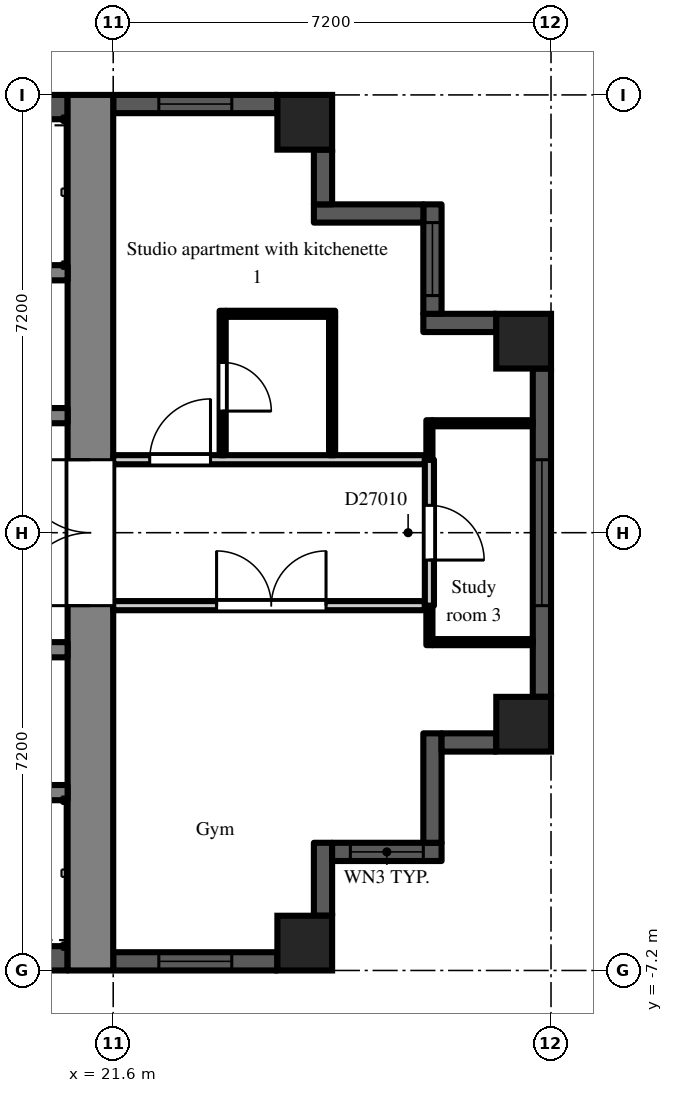
"""IFC4 building model, lengths in metres.
Left out: names, types, materials, properties, quantities, classifications, styles, units other than length and angle.
Written with IfcOpenShell. Run it as: python <this file> out.ifc"""

import sys

from ifc_helpers import new_model, si_unit, direction, frame, frame_2d, origin, origin_2d, place, context, subcontext, project, spatial, rectangle, extrude, element, fill, save


model = new_model("IFC4")
c1 = context("Model", 3, precision=1e-05, world=origin(), true_north=direction((0.0, 1.0)))
c2 = subcontext(c1, "Body", "Model", "MODEL_VIEW")
j1 = project(units=[si_unit("LENGTHUNIT", "METRE"), si_unit("PLANEANGLEUNIT", "RADIAN")], contexts=[c1])
p1 = place(None, origin())
s1 = spatial("IfcSite", under=j1, at=p1, CompositionType="ELEMENT")
p2 = place(p1, origin())
s2 = spatial("IfcBuilding", under=s1, at=p2, CompositionType="ELEMENT")
p3 = place(p2, frame((0.0, 0.0, 188.7)))
s3 = spatial("IfcBuildingStorey", under=s2, at=p3, CompositionType="ELEMENT", Elevation=188.7)
for number, where, z_axis, x_axis in (
    (1, (24.75, -6.75, 0.0), (0.0, 0.0, 1.0), (1.0, 0.0, 0.0)),
    (2, (24.75, 6.75, 0.0), (0.0, 0.0, 1.0), (1.0, 0.0, 0.0)),
    (3, (28.35, -3.15, 0.0), (0.0, 0.0, 1.0), (1.0, 0.0, 0.0)),
    (4, (28.35, 3.15, 0.0), (0.0, 0.0, 1.0), (1.0, 0.0, 0.0)),
):
    element("IfcColumn", number, at=place(p3, frame(where, z_axis=z_axis, x_axis=x_axis)), inside=s3, PredefinedType="COLUMN", context=c2, shape_type="SweptSolid", body=[
        extrude(rectangle(XDim=0.9, YDim=0.9, at=origin_2d()), origin(), (0.0, 0.0, 1.0), 3.0),
    ])
p4 = place(p3, frame((21.6, -7.05, 0.0), z_axis=(0.0, 0.0, 1.0), x_axis=(1.0, 0.0, 0.0)))
e5 = element("IfcWall", 5, at=p4, inside=s3, PredefinedType="SOLIDWALL", context=c2, shape_type="SweptSolid", body=[
    extrude(rectangle(XDim=2.7, YDim=0.3, at=frame_2d((1.35, 0.0))), origin(), (0.0, 0.0, 1.0), 2.2),
])
p5 = place(p4, frame((0.75, 0.0, 0.2)))
e6 = element("IfcOpeningElement", 6, at=p5, cuts=e5, PredefinedType="OPENING", context=c2, shape_type="SweptSolid", body=[
    extrude(rectangle(XDim=1.2, YDim=1.85, at=frame_2d((0.6, 0.925))), frame((0.0, 0.16, 0.0), z_axis=(0.0, -1.0, 0.0), x_axis=(1.0, 0.0, 0.0)), (0.0, 0.0, 1.0), 0.32),
])
p6 = place(p3, frame((25.05, -6.3, 0.0), z_axis=(0.0, 0.0, 1.0), x_axis=(0.0, 1.0, 0.0)))
e7 = element("IfcWall", 7, at=p6, inside=s3, PredefinedType="SOLIDWALL", context=c2, shape_type="SweptSolid", body=[
    extrude(rectangle(XDim=1.2, YDim=0.3, at=frame_2d((0.6, 0.0))), origin(), (0.0, 0.0, 1.0), 2.6),
])
p7 = place(p3, frame((25.2, -5.25, 0.0), z_axis=(0.0, 0.0, 1.0), x_axis=(1.0, 0.0, 0.0)))
e8 = element("IfcWall", 8, at=p7, inside=s3, PredefinedType="SOLIDWALL", context=c2, shape_type="SweptSolid", body=[
    extrude(rectangle(XDim=1.8, YDim=0.3, at=frame_2d((0.9, 0.0))), origin(), (0.0, 0.0, 1.0), 2.6),
])
p8 = place(p7, frame((0.3, 0.0, 0.2)))
e9 = element("IfcOpeningElement", 9, at=p8, cuts=e8, PredefinedType="OPENING", context=c2, shape_type="SweptSolid", body=[
    extrude(rectangle(XDim=1.2, YDim=1.85, at=frame_2d((0.6, 0.925))), frame((0.0, 0.16, 0.0), z_axis=(0.0, -1.0, 0.0), x_axis=(1.0, 0.0, 0.0)), (0.0, 0.0, 1.0), 0.32),
])
p9 = place(p3, frame((26.85, -5.1, 0.0), z_axis=(0.0, 0.0, 1.0), x_axis=(0.0, 1.0, 0.0)))
e10 = element("IfcWall", 10, at=p9, inside=s3, PredefinedType="SOLIDWALL", context=c2, shape_type="SweptSolid", body=[
    extrude(rectangle(XDim=1.8, YDim=0.3, at=frame_2d((0.9, 0.0))), origin(), (0.0, 0.0, 1.0), 2.6),
])
p10 = place(p3, frame((27.0, -3.45, 0.0), z_axis=(0.0, 0.0, 1.0), x_axis=(1.0, 0.0, 0.0)))
e11 = element("IfcWall", 11, at=p10, inside=s3, PredefinedType="SOLIDWALL", context=c2, shape_type="SweptSolid", body=[
    extrude(rectangle(XDim=0.9, YDim=0.3, at=frame_2d((0.45, 0.0))), origin(), (0.0, 0.0, 1.0), 2.6),
])
p11 = place(p3, frame((28.65, -2.7, 0.0), z_axis=(0.0, 0.0, 1.0), x_axis=(0.0, 1.0, 0.0)))
e12 = element("IfcWall", 12, at=p11, inside=s3, PredefinedType="SOLIDWALL", context=c2, shape_type="SweptSolid", body=[
    extrude(rectangle(XDim=5.4, YDim=0.3, at=frame_2d((2.7, 0.0))), origin(), (0.0, 0.0, 1.0), 2.2),
])
p12 = place(p11, frame((1.5, 0.0, 0.2)))
e13 = element("IfcOpeningElement", 13, at=p12, cuts=e12, PredefinedType="OPENING", context=c2, shape_type="SweptSolid", body=[
    extrude(rectangle(XDim=2.4, YDim=1.85, at=frame_2d((1.2, 0.925))), frame((0.0, 0.16, 0.0), z_axis=(0.0, -1.0, 0.0), x_axis=(1.0, 0.0, 0.0)), (0.0, 0.0, 1.0), 0.32),
])
p13 = place(p3, frame((27.9, 3.45, 0.0), z_axis=(0.0, 0.0, 1.0), x_axis=(-1.0, 0.0, 0.0)))
e14 = element("IfcWall", 14, at=p13, inside=s3, PredefinedType="SOLIDWALL", context=c2, shape_type="SweptSolid", body=[
    extrude(rectangle(XDim=1.2, YDim=0.3, at=frame_2d((0.6, 0.0))), origin(), (0.0, 0.0, 1.0), 2.6),
])
p14 = place(p3, frame((26.85, 3.6, 0.0), z_axis=(0.0, 0.0, 1.0), x_axis=(0.0, 1.0, 0.0)))
e15 = element("IfcWall", 15, at=p14, inside=s3, PredefinedType="SOLIDWALL", context=c2, shape_type="SweptSolid", body=[
    extrude(rectangle(XDim=1.8, YDim=0.3, at=frame_2d((0.9, 0.0))), origin(), (0.0, 0.0, 1.0), 2.6),
])
p15 = place(p14, frame((0.3, 0.0, 0.2)))
e16 = element("IfcOpeningElement", 16, at=p15, cuts=e15, PredefinedType="OPENING", context=c2, shape_type="SweptSolid", body=[
    extrude(rectangle(XDim=1.2, YDim=1.85, at=frame_2d((0.6, 0.925))), frame((0.0, 0.16, 0.0), z_axis=(0.0, -1.0, 0.0), x_axis=(1.0, 0.0, 0.0)), (0.0, 0.0, 1.0), 0.32),
])
p16 = place(p3, frame((26.7, 5.25, 0.0), z_axis=(0.0, 0.0, 1.0), x_axis=(-1.0, 0.0, 0.0)))
e17 = element("IfcWall", 17, at=p16, inside=s3, PredefinedType="SOLIDWALL", context=c2, shape_type="SweptSolid", body=[
    extrude(rectangle(XDim=1.8, YDim=0.3, at=frame_2d((0.9, 0.0))), origin(), (0.0, 0.0, 1.0), 2.6),
])
p17 = place(p3, frame((25.05, 5.4, 0.0), z_axis=(0.0, 0.0, 1.0), x_axis=(0.0, 1.0, 0.0)))
e18 = element("IfcWall", 18, at=p17, inside=s3, PredefinedType="SOLIDWALL", context=c2, shape_type="SweptSolid", body=[
    extrude(rectangle(XDim=0.9, YDim=0.3, at=frame_2d((0.45, 0.0))), origin(), (0.0, 0.0, 1.0), 2.6),
])
p18 = place(p3, frame((24.3, 7.05, 0.0), z_axis=(0.0, 0.0, 1.0), x_axis=(-1.0, 0.0, 0.0)))
e19 = element("IfcWall", 19, at=p18, inside=s3, PredefinedType="SOLIDWALL", context=c2, shape_type="SweptSolid", body=[
    extrude(rectangle(XDim=2.7, YDim=0.3, at=frame_2d((1.35, 0.0))), origin(), (0.0, 0.0, 1.0), 2.2),
])
p19 = place(p18, frame((0.75, 0.0, 0.2)))
e20 = element("IfcOpeningElement", 20, at=p19, cuts=e19, PredefinedType="OPENING", context=c2, shape_type="SweptSolid", body=[
    extrude(rectangle(XDim=1.2, YDim=1.85, at=frame_2d((0.6, 0.925))), frame((0.0, 0.16, 0.0), z_axis=(0.0, -1.0, 0.0), x_axis=(1.0, 0.0, 0.0)), (0.0, 0.0, 1.0), 0.32),
])
p20 = place(p3, frame((21.225, -7.2, 0.0), z_axis=(0.0, 0.0, 1.0), x_axis=(0.0, 1.0, 0.0)))
e21 = element("IfcWall", 21, at=p20, inside=s3, PredefinedType="SHEAR", context=c2, shape_type="SweptSolid", body=[
    extrude(rectangle(XDim=14.4, YDim=0.75, at=frame_2d((7.2, 0.0))), origin(), (0.0, 0.0, 1.0), 2.6),
])
p21 = place(p20, frame((6.0, 0.0, 0.0)))
e22 = element("IfcOpeningElement", 22, at=p21, cuts=e21, PredefinedType="OPENING", context=c2, shape_type="SweptSolid", body=[
    extrude(rectangle(XDim=2.4, YDim=2.2, at=frame_2d((1.2, 1.1))), frame((0.0, 0.385, 0.0), z_axis=(0.0, -1.0, 0.0), x_axis=(1.0, 0.0, 0.0)), (0.0, 0.0, 1.0), 0.77),
])
p22 = place(p3, frame((7.9, 7.0, 0.0), z_axis=(0.0, 0.0, 1.0), x_axis=(1.0, 0.0, 0.0)))
e23 = element("IfcWall", 23, at=p22, inside=s3, PredefinedType="SHEAR", context=c2, shape_type="SweptSolid", body=[
    extrude(rectangle(XDim=12.95, YDim=0.4, at=frame_2d((6.475, 0.0))), origin(), (0.0, 0.0, 1.0), 2.6),
])
p23 = place(p3, frame((7.9, 1.925, 0.0), z_axis=(0.0, 0.0, 1.0), x_axis=(1.0, 0.0, 0.0)))
e24 = element("IfcWall", 24, at=p23, inside=s3, PredefinedType="SHEAR", context=c2, shape_type="SweptSolid", body=[
    extrude(rectangle(XDim=12.95, YDim=0.25, at=frame_2d((6.475, 0.0))), origin(), (0.0, 0.0, 1.0), 2.6),
])
p24 = place(p23, frame((4.825, 0.0, 0.0)))
e25 = element("IfcOpeningElement", 25, at=p24, cuts=e24, PredefinedType="OPENING", context=c2, shape_type="SweptSolid", body=[
    extrude(rectangle(XDim=1.1, YDim=2.1, at=frame_2d((0.55, 1.05))), frame((0.0, 0.135, 0.0), z_axis=(0.0, -1.0, 0.0), x_axis=(1.0, 0.0, 0.0)), (0.0, 0.0, 1.0), 0.27),
])
p25 = place(p23, frame((7.025, 0.0, 0.0)))
e26 = element("IfcOpeningElement", 26, at=p25, cuts=e24, PredefinedType="OPENING", context=c2, shape_type="SweptSolid", body=[
    extrude(rectangle(XDim=1.1, YDim=2.1, at=frame_2d((0.55, 1.05))), frame((0.0, 0.135, 0.0), z_axis=(0.0, -1.0, 0.0), x_axis=(1.0, 0.0, 0.0)), (0.0, 0.0, 1.0), 0.27),
])
p26 = place(p23, frame((9.225, 0.0, 0.0)))
e27 = element("IfcOpeningElement", 27, at=p26, cuts=e24, PredefinedType="OPENING", context=c2, shape_type="SweptSolid", body=[
    extrude(rectangle(XDim=1.1, YDim=2.1, at=frame_2d((0.55, 1.05))), frame((0.0, 0.135, 0.0), z_axis=(0.0, -1.0, 0.0), x_axis=(1.0, 0.0, 0.0)), (0.0, 0.0, 1.0), 0.27),
])
p27 = place(p23, frame((0.525, 0.0, 0.0)))
e28 = element("IfcOpeningElement", 28, at=p27, cuts=e24, PredefinedType="OPENING", context=c2, shape_type="SweptSolid", body=[
    extrude(rectangle(XDim=0.9, YDim=2.1, at=frame_2d((0.45, 1.05))), frame((0.0, 0.135, 0.0), z_axis=(0.0, -1.0, 0.0), x_axis=(1.0, 0.0, 0.0)), (0.0, 0.0, 1.0), 0.27),
])
p28 = place(p23, frame((2.625, 0.0, 0.0)))
e29 = element("IfcOpeningElement", 29, at=p28, cuts=e24, PredefinedType="OPENING", context=c2, shape_type="SweptSolid", body=[
    extrude(rectangle(XDim=1.1, YDim=2.1, at=frame_2d((0.55, 1.05))), frame((0.0, 0.135, 0.0), z_axis=(0.0, -1.0, 0.0), x_axis=(1.0, 0.0, 0.0)), (0.0, 0.0, 1.0), 0.27),
])
p29 = place(p23, frame((11.525, 0.0, 0.0)))
e30 = element("IfcOpeningElement", 30, at=p29, cuts=e24, PredefinedType="OPENING", context=c2, shape_type="SweptSolid", body=[
    extrude(rectangle(XDim=0.9, YDim=2.1, at=frame_2d((0.45, 1.05))), frame((0.0, 0.135, 0.0), z_axis=(0.0, -1.0, 0.0), x_axis=(1.0, 0.0, 0.0)), (0.0, 0.0, 1.0), 0.27),
])
p30 = place(p3, frame((12.3, 4.275, 0.0), z_axis=(0.0, 0.0, 1.0), x_axis=(1.0, 0.0, 0.0)))
e31 = element("IfcWall", 31, at=p30, inside=s3, PredefinedType="SHEAR", context=c2, shape_type="SweptSolid", body=[
    extrude(rectangle(XDim=8.55, YDim=0.25, at=frame_2d((4.275, 0.0))), origin(), (0.0, 0.0, 1.0), 2.6),
])
p31 = place(p3, frame((7.9, -7.0, 0.0), z_axis=(0.0, 0.0, 1.0), x_axis=(1.0, 0.0, 0.0)))
e32 = element("IfcWall", 32, at=p31, inside=s3, PredefinedType="SHEAR", context=c2, shape_type="SweptSolid", body=[
    extrude(rectangle(XDim=12.95, YDim=0.4, at=frame_2d((6.475, 0.0))), origin(), (0.0, 0.0, 1.0), 2.6),
])
p32 = place(p3, frame((7.9, -1.925, 0.0), z_axis=(0.0, 0.0, 1.0), x_axis=(1.0, 0.0, 0.0)))
e33 = element("IfcWall", 33, at=p32, inside=s3, PredefinedType="SHEAR", context=c2, shape_type="SweptSolid", body=[
    extrude(rectangle(XDim=12.95, YDim=0.25, at=frame_2d((6.475, 0.0))), origin(), (0.0, 0.0, 1.0), 2.6),
])
p33 = place(p32, frame((0.525, 0.0, 0.0)))
e34 = element("IfcOpeningElement", 34, at=p33, cuts=e33, PredefinedType="OPENING", context=c2, shape_type="SweptSolid", body=[
    extrude(rectangle(XDim=0.9, YDim=2.1, at=frame_2d((0.45, 1.05))), frame((0.0, 0.135, 0.0), z_axis=(0.0, -1.0, 0.0), x_axis=(1.0, 0.0, 0.0)), (0.0, 0.0, 1.0), 0.27),
])
p34 = place(p32, frame((2.625, 0.0, 0.0)))
e35 = element("IfcOpeningElement", 35, at=p34, cuts=e33, PredefinedType="OPENING", context=c2, shape_type="SweptSolid", body=[
    extrude(rectangle(XDim=1.1, YDim=2.1, at=frame_2d((0.55, 1.05))), frame((0.0, 0.135, 0.0), z_axis=(0.0, -1.0, 0.0), x_axis=(1.0, 0.0, 0.0)), (0.0, 0.0, 1.0), 0.27),
])
p35 = place(p32, frame((8.225, 0.0, 0.0)))
e36 = element("IfcOpeningElement", 36, at=p35, cuts=e33, PredefinedType="OPENING", context=c2, shape_type="SweptSolid", body=[
    extrude(rectangle(XDim=0.9, YDim=2.1, at=frame_2d((0.45, 1.05))), frame((0.0, 0.135, 0.0), z_axis=(0.0, -1.0, 0.0), x_axis=(1.0, 0.0, 0.0)), (0.0, 0.0, 1.0), 0.27),
])
p36 = place(p3, frame((12.3, -4.275, 0.0), z_axis=(0.0, 0.0, 1.0), x_axis=(1.0, 0.0, 0.0)))
e37 = element("IfcWall", 37, at=p36, inside=s3, PredefinedType="SHEAR", context=c2, shape_type="SweptSolid", body=[
    extrude(rectangle(XDim=8.55, YDim=0.25, at=frame_2d((4.275, 0.0))), origin(), (0.0, 0.0, 1.0), 2.6),
])
p37 = place(p3, frame((21.6, -1.2, 0.0), z_axis=(0.0, 0.0, 1.0), x_axis=(1.0, 0.0, 0.0)))
e38 = element("IfcWall", 38, at=p37, inside=s3, PredefinedType="PARTITIONING", context=c2, shape_type="SweptSolid", body=[
    extrude(rectangle(XDim=5.125, YDim=0.15, at=frame_2d((2.562, 0.0))), origin(), (0.0, 0.0, 1.0), 2.6),
])
p38 = place(p37, frame((1.7, 0.0, 0.0)))
e39 = element("IfcOpeningElement", 39, at=p38, cuts=e38, PredefinedType="OPENING", context=c2, shape_type="SweptSolid", body=[
    extrude(rectangle(XDim=1.8, YDim=2.1, at=frame_2d((0.9, 1.05))), frame((0.0, 0.085, 0.0), z_axis=(0.0, -1.0, 0.0), x_axis=(1.0, 0.0, 0.0)), (0.0, 0.0, 1.0), 0.17),
])
p39 = place(p3, frame((21.6, 1.2, 0.0), z_axis=(0.0, 0.0, 1.0), x_axis=(1.0, 0.0, 0.0)))
e40 = element("IfcWall", 40, at=p39, inside=s3, PredefinedType="PARTITIONING", context=c2, shape_type="SweptSolid", body=[
    extrude(rectangle(XDim=5.125, YDim=0.15, at=frame_2d((2.562, 0.0))), origin(), (0.0, 0.0, 1.0), 2.6),
])
p40 = place(p39, frame((0.6, 0.0, 0.0)))
e41 = element("IfcOpeningElement", 41, at=p40, cuts=e40, PredefinedType="OPENING", context=c2, shape_type="SweptSolid", body=[
    extrude(rectangle(XDim=1.0, YDim=2.1, at=frame_2d((0.5, 1.05))), frame((0.0, 0.085, 0.0), z_axis=(0.0, -1.0, 0.0), x_axis=(1.0, 0.0, 0.0)), (0.0, 0.0, 1.0), 0.17),
])
p41 = place(p3, frame((23.4, 1.275, 0.0), z_axis=(0.0, 0.0, 1.0), x_axis=(0.0, 1.0, 0.0)))
e42 = element("IfcWall", 42, at=p41, inside=s3, PredefinedType="PARTITIONING", context=c2, shape_type="SweptSolid", body=[
    extrude(rectangle(XDim=2.375, YDim=0.1, at=frame_2d((1.188, 0.0))), origin(), (0.0, 0.0, 1.0), 2.6),
])
p42 = place(p41, frame((0.725, 0.0, 0.0)))
e43 = element("IfcOpeningElement", 43, at=p42, cuts=e42, PredefinedType="OPENING", context=c2, shape_type="SweptSolid", body=[
    extrude(rectangle(XDim=0.8, YDim=2.1, at=frame_2d((0.4, 1.05))), frame((0.0, 0.06, 0.0), z_axis=(0.0, -1.0, 0.0), x_axis=(1.0, 0.0, 0.0)), (0.0, 0.0, 1.0), 0.12),
])
p43 = place(p3, frame((23.45, 3.6, 0.0), z_axis=(0.0, 0.0, 1.0), x_axis=(1.0, 0.0, 0.0)))
e44 = element("IfcWall", 44, at=p43, inside=s3, PredefinedType="PARTITIONING", context=c2, shape_type="SweptSolid", body=[
    extrude(rectangle(XDim=1.8, YDim=0.1, at=frame_2d((0.9, 0.0))), origin(), (0.0, 0.0, 1.0), 2.6),
])
p44 = place(p3, frame((25.2, 1.275, 0.0), z_axis=(0.0, 0.0, 1.0), x_axis=(0.0, 1.0, 0.0)))
e45 = element("IfcWall", 45, at=p44, inside=s3, PredefinedType="PARTITIONING", context=c2, shape_type="SweptSolid", body=[
    extrude(rectangle(XDim=2.275, YDim=0.1, at=frame_2d((1.138, 0.0))), origin(), (0.0, 0.0, 1.0), 2.6),
])
p45 = place(p3, frame((26.8, -1.85, 0.0), z_axis=(0.0, 0.0, 1.0), x_axis=(0.0, 1.0, 0.0)))
e46 = element("IfcWall", 46, at=p45, inside=s3, PredefinedType="PARTITIONING", context=c2, shape_type="SweptSolid", body=[
    extrude(rectangle(XDim=0.65, YDim=0.1, at=frame_2d((0.325, 0.0))), origin(), (0.0, 0.0, 1.0), 2.6),
])
p46 = place(p3, frame((26.85, -1.8, 0.0), z_axis=(0.0, 0.0, 1.0), x_axis=(1.0, 0.0, 0.0)))
e47 = element("IfcWall", 47, at=p46, inside=s3, PredefinedType="PARTITIONING", context=c2, shape_type="SweptSolid", body=[
    extrude(rectangle(XDim=1.65, YDim=0.1, at=frame_2d((0.825, 0.0))), origin(), (0.0, 0.0, 1.0), 2.6),
])
p47 = place(p3, frame((26.8, -1.2, 0.0), z_axis=(0.0, 0.0, 1.0), x_axis=(0.0, 1.0, 0.0)))
e48 = element("IfcWall", 48, at=p47, inside=s3, PredefinedType="PARTITIONING", context=c2, shape_type="SweptSolid", body=[
    extrude(rectangle(XDim=2.4, YDim=0.15, at=frame_2d((1.2, 0.0))), origin(), (0.0, 0.0, 1.0), 2.6),
])
p48 = place(p47, frame((0.75, 0.0, 0.0)))
e49 = element("IfcOpeningElement", 49, at=p48, cuts=e48, PredefinedType="OPENING", context=c2, shape_type="SweptSolid", body=[
    extrude(rectangle(XDim=0.9, YDim=2.1, at=frame_2d((0.45, 1.05))), frame((0.0, 0.085, 0.0), z_axis=(0.0, -1.0, 0.0), x_axis=(1.0, 0.0, 0.0)), (0.0, 0.0, 1.0), 0.17),
])
p49 = place(p3, frame((26.8, 1.2, 0.0), z_axis=(0.0, 0.0, 1.0), x_axis=(0.0, 1.0, 0.0)))
e50 = element("IfcWall", 50, at=p49, inside=s3, PredefinedType="PARTITIONING", context=c2, shape_type="SweptSolid", body=[
    extrude(rectangle(XDim=0.65, YDim=0.1, at=frame_2d((0.325, 0.0))), origin(), (0.0, 0.0, 1.0), 2.6),
])
p50 = place(p3, frame((26.85, 1.8, 0.0), z_axis=(0.0, 0.0, 1.0), x_axis=(1.0, 0.0, 0.0)))
e51 = element("IfcWall", 51, at=p50, inside=s3, PredefinedType="PARTITIONING", context=c2, shape_type="SweptSolid", body=[
    extrude(rectangle(XDim=1.65, YDim=0.1, at=frame_2d((0.825, 0.0))), origin(), (0.0, 0.0, 1.0), 2.6),
])
p51 = place(p5, origin())
e52 = element("IfcWindow", 52, at=p51, inside=s3, PartitioningType="SINGLE_PANEL", PredefinedType="WINDOW", context=c2, shape_type="SweptSolid", body=[
    extrude(rectangle(XDim=1.2, YDim=1.85, at=frame_2d((0.6, 0.925))), frame((0.0, 0.03, 0.0), z_axis=(0.0, -1.0, 0.0), x_axis=(1.0, 0.0, 0.0)), (0.0, 0.0, 1.0), 0.06),
])
fill(e6, e52)
p52 = place(p8, origin())
e53 = element("IfcWindow", 53, at=p52, inside=s3, PartitioningType="SINGLE_PANEL", PredefinedType="WINDOW", context=c2, shape_type="SweptSolid", body=[
    extrude(rectangle(XDim=1.2, YDim=1.85, at=frame_2d((0.6, 0.925))), frame((0.0, 0.03, 0.0), z_axis=(0.0, -1.0, 0.0), x_axis=(1.0, 0.0, 0.0)), (0.0, 0.0, 1.0), 0.06),
])
fill(e9, e53)
p53 = place(p12, origin())
e54 = element("IfcWindow", 54, at=p53, inside=s3, PartitioningType="SINGLE_PANEL", PredefinedType="WINDOW", context=c2, shape_type="SweptSolid", body=[
    extrude(rectangle(XDim=2.4, YDim=1.85, at=frame_2d((1.2, 0.925))), frame((0.0, 0.03, 0.0), z_axis=(0.0, -1.0, 0.0), x_axis=(1.0, 0.0, 0.0)), (0.0, 0.0, 1.0), 0.06),
])
fill(e13, e54)
p54 = place(p15, origin())
e55 = element("IfcWindow", 55, at=p54, inside=s3, PartitioningType="SINGLE_PANEL", PredefinedType="WINDOW", context=c2, shape_type="SweptSolid", body=[
    extrude(rectangle(XDim=1.2, YDim=1.85, at=frame_2d((0.6, 0.925))), frame((0.0, 0.03, 0.0), z_axis=(0.0, -1.0, 0.0), x_axis=(1.0, 0.0, 0.0)), (0.0, 0.0, 1.0), 0.06),
])
fill(e16, e55)
p55 = place(p19, origin())
e56 = element("IfcWindow", 56, at=p55, inside=s3, PartitioningType="SINGLE_PANEL", PredefinedType="WINDOW", context=c2, shape_type="SweptSolid", body=[
    extrude(rectangle(XDim=1.2, YDim=1.85, at=frame_2d((0.6, 0.925))), frame((0.0, 0.03, 0.0), z_axis=(0.0, -1.0, 0.0), x_axis=(1.0, 0.0, 0.0)), (0.0, 0.0, 1.0), 0.06),
])
fill(e20, e56)
p56 = place(p21, origin())
e57 = element("IfcDoor", 57, at=p56, inside=s3, OperationType="DOUBLE_DOOR_DOUBLE_SWING", PredefinedType="DOOR", context=c2, shape_type="SweptSolid", body=[
    extrude(rectangle(XDim=2.4, YDim=2.2, at=frame_2d((1.2, 1.1))), frame((0.0, 0.025, 0.0), z_axis=(0.0, -1.0, 0.0), x_axis=(1.0, 0.0, 0.0)), (0.0, 0.0, 1.0), 0.05),
])
fill(e22, e57)
p57 = place(p48, frame((0.9, 0.0, 0.0), z_axis=(0.0, 0.0, 1.0), x_axis=(-1.0, 0.0, 0.0)))
e58 = element("IfcDoor", 58, at=p57, inside=s3, OperationType="SINGLE_SWING_RIGHT", PredefinedType="DOOR", context=c2, shape_type="SweptSolid", body=[
    extrude(rectangle(XDim=0.9, YDim=2.1, at=frame_2d((0.45, 1.05))), frame((0.0, 0.025, 0.0), z_axis=(0.0, -1.0, 0.0), x_axis=(1.0, 0.0, 0.0)), (0.0, 0.0, 1.0), 0.05),
])
fill(e49, e58)
p58 = place(p42, frame((0.8, 0.0, 0.0), z_axis=(0.0, 0.0, 1.0), x_axis=(-1.0, 0.0, 0.0)))
e59 = element("IfcDoor", 59, at=p58, inside=s3, OperationType="SINGLE_SWING_RIGHT", PredefinedType="DOOR", context=c2, shape_type="SweptSolid", body=[
    extrude(rectangle(XDim=0.8, YDim=2.1, at=frame_2d((0.4, 1.05))), frame((0.0, 0.025, 0.0), z_axis=(0.0, -1.0, 0.0), x_axis=(1.0, 0.0, 0.0)), (0.0, 0.0, 1.0), 0.05),
])
fill(e43, e59)
p59 = place(p40, origin())
e60 = element("IfcDoor", 60, at=p59, inside=s3, OperationType="SINGLE_SWING_RIGHT", PredefinedType="DOOR", context=c2, shape_type="SweptSolid", body=[
    extrude(rectangle(XDim=1.0, YDim=2.1, at=frame_2d((0.5, 1.05))), frame((0.0, 0.025, 0.0), z_axis=(0.0, -1.0, 0.0), x_axis=(1.0, 0.0, 0.0)), (0.0, 0.0, 1.0), 0.05),
])
fill(e41, e60)
p60 = place(p38, origin())
e61 = element("IfcDoor", 61, at=p60, inside=s3, OperationType="DOUBLE_DOOR_DOUBLE_SWING", PredefinedType="DOOR", context=c2, shape_type="SweptSolid", body=[
    extrude(rectangle(XDim=1.8, YDim=2.1, at=frame_2d((0.9, 1.05))), frame((0.0, 0.025, 0.0), z_axis=(0.0, -1.0, 0.0), x_axis=(1.0, 0.0, 0.0)), (0.0, 0.0, 1.0), 0.05),
])
fill(e39, e61)
save(model, sys.argv[1])
